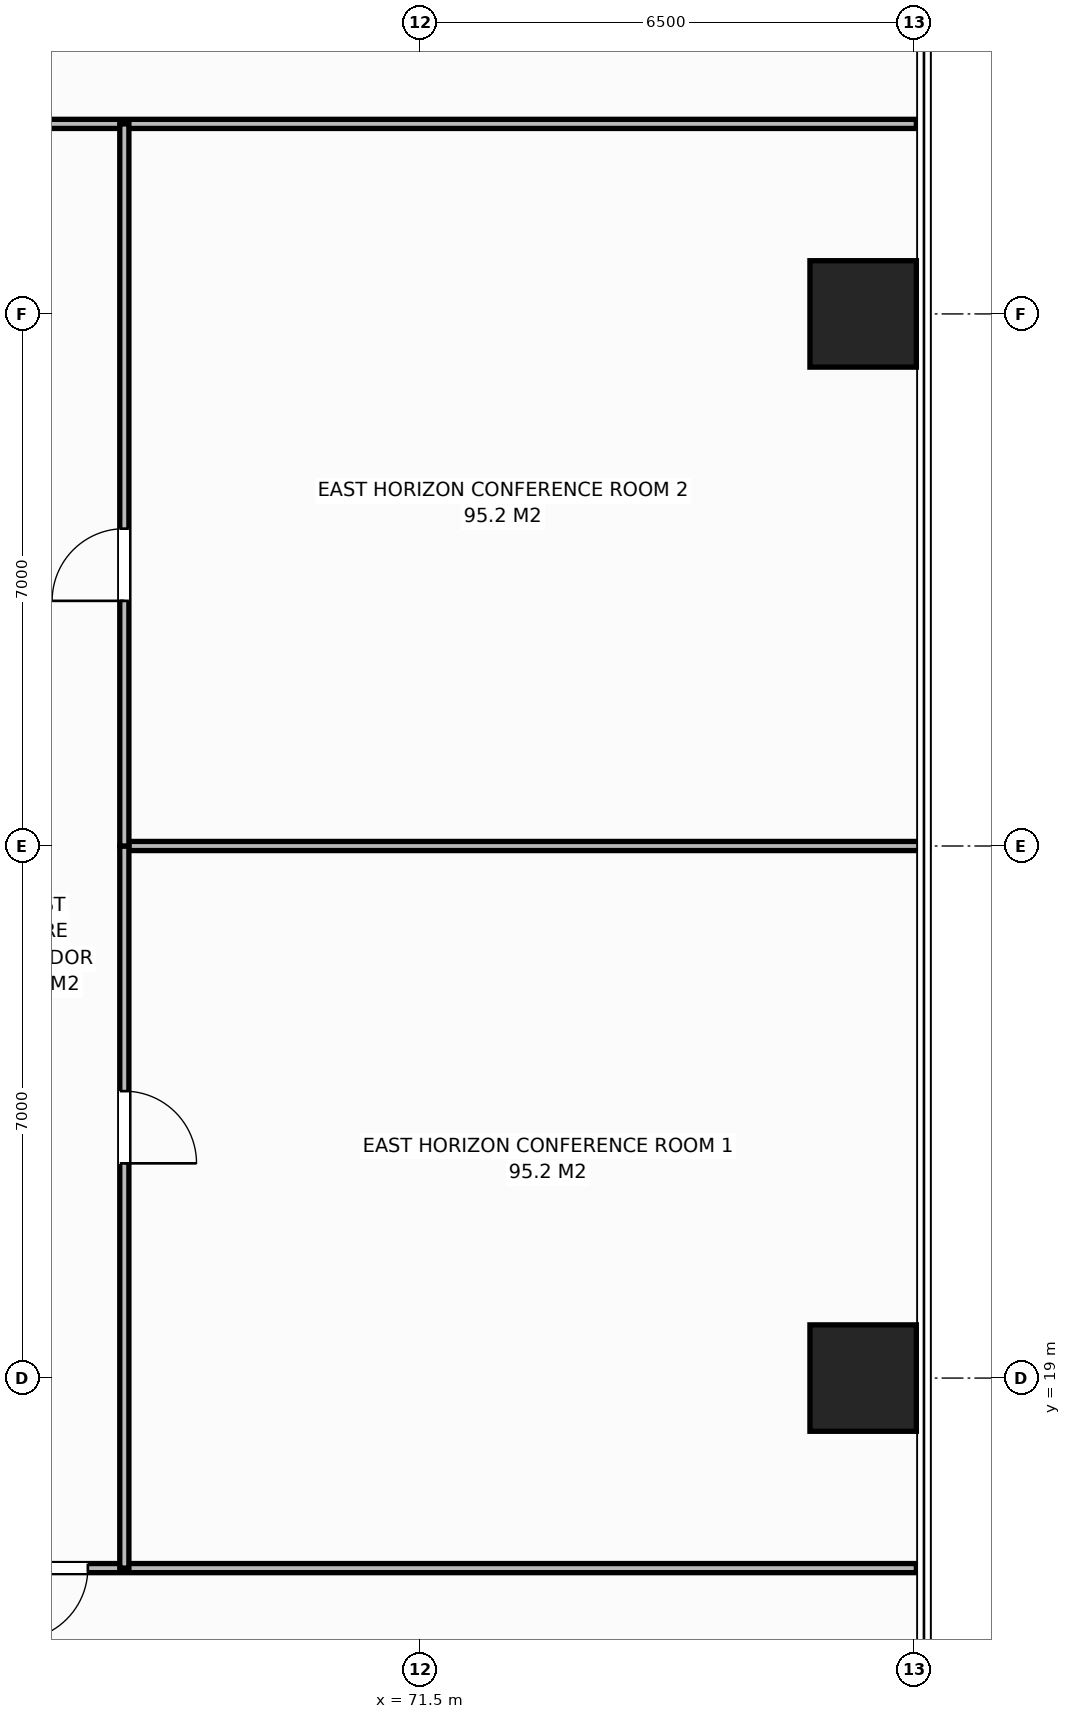
"""IFC4 building model, lengths in metres.
Left out: names, types, materials, properties, quantities, classifications, styles, units other than length and angle.
Written with IfcOpenShell. Run it as: python <this file> out.ifc"""

import sys

from ifc_helpers import new_model, si_unit, direction, frame, frame_2d, origin, origin_2d, place, context, subcontext, project, spatial, rectangle, extrude, element, fill, save


model = new_model("IFC4")
c1 = context("Model", 3, precision=1e-05, world=origin(), true_north=direction((0.0, 1.0)))
c2 = subcontext(c1, "Body", "Model", "MODEL_VIEW")
j1 = project(units=[si_unit("LENGTHUNIT", "METRE"), si_unit("PLANEANGLEUNIT", "RADIAN")], contexts=[c1])
p1 = place(None, origin())
s1 = spatial("IfcSite", under=j1, at=p1, CompositionType="ELEMENT")
p2 = place(p1, origin())
s2 = spatial("IfcBuilding", under=s1, at=p2, CompositionType="ELEMENT")
p3 = place(p2, frame((0.0, 0.0, 69.6)))
s3 = spatial("IfcBuildingStorey", under=s2, at=p3, CompositionType="ELEMENT", Elevation=69.6)
for number, where, z_axis, x_axis in (
    (1, (77.32, 19.0, 0.0), (0.0, 0.0, 1.0), (1.0, 0.0, 0.0)),
    (2, (77.32, 33.0, 0.0), (0.0, 0.0, 1.0), (1.0, 0.0, 0.0)),
):
    element("IfcColumn", number, at=place(p3, frame(where, z_axis=z_axis, x_axis=x_axis)), inside=s3, PredefinedType="COLUMN", context=c2, shape_type="SweptSolid", body=[
        extrude(rectangle(XDim=1.4, YDim=1.4, at=origin_2d()), origin(), (0.0, 0.0, 1.0), 3.8),
    ])
p4 = place(p3, frame((56.884, 35.5, 0.0), z_axis=(0.0, 0.0, 1.0), x_axis=(1.0, 0.0, 0.0)))
e3 = element("IfcWall", 3, at=p4, inside=s3, PredefinedType="PARTITIONING", context=c2, shape_type="SweptSolid", body=[
    extrude(rectangle(XDim=21.136, YDim=0.12, at=frame_2d((10.568, 0.0))), origin(), (0.0, 0.0, 1.0), 3.55),
])
p5 = place(p4, frame((4.883, 0.0, 0.0)))
e4 = element("IfcOpeningElement", 4, at=p5, cuts=e3, PredefinedType="OPENING", context=c2, shape_type="SweptSolid", body=[
    extrude(rectangle(XDim=0.95, YDim=2.15, at=frame_2d((0.475, 1.075))), frame((0.0, 0.07, 0.0), z_axis=(0.0, -1.0, 0.0), x_axis=(1.0, 0.0, 0.0)), (0.0, 0.0, 1.0), 0.14),
])
p6 = place(p3, frame((64.86, 16.5, 0.0), z_axis=(0.0, 0.0, 1.0), x_axis=(1.0, 0.0, 0.0)))
e5 = element("IfcWall", 5, at=p6, inside=s3, PredefinedType="PARTITIONING", context=c2, shape_type="SweptSolid", body=[
    extrude(rectangle(XDim=13.16, YDim=0.12, at=frame_2d((6.58, 0.0))), origin(), (0.0, 0.0, 1.0), 3.55),
])
p7 = place(p6, frame((1.31, 0.0, 0.0)))
e6 = element("IfcOpeningElement", 6, at=p7, cuts=e5, PredefinedType="OPENING", context=c2, shape_type="SweptSolid", body=[
    extrude(rectangle(XDim=0.95, YDim=2.15, at=frame_2d((0.475, 1.075))), frame((0.0, 0.07, 0.0), z_axis=(0.0, -1.0, 0.0), x_axis=(1.0, 0.0, 0.0)), (0.0, 0.0, 1.0), 0.14),
])
p8 = place(p3, frame((67.6, 26.0, 0.0), z_axis=(0.0, 0.0, 1.0), x_axis=(1.0, 0.0, 0.0)))
e7 = element("IfcWall", 7, at=p8, inside=s3, PredefinedType="PARTITIONING", context=c2, shape_type="SweptSolid", body=[
    extrude(rectangle(XDim=10.58, YDim=0.12, at=frame_2d((5.29, 0.0))), origin(), (0.0, 0.0, 1.0), 3.55),
])
p9 = place(p3, frame((67.6, 16.5, 0.0), z_axis=(0.0, 0.0, 1.0), x_axis=(0.0, 1.0, 0.0)))
e8 = element("IfcWall", 8, at=p9, inside=s3, PredefinedType="PARTITIONING", context=c2, shape_type="SweptSolid", body=[
    extrude(rectangle(XDim=9.5, YDim=0.12, at=frame_2d((4.75, 0.0))), origin(), (0.0, 0.0, 1.0), 3.55),
])
p10 = place(p9, frame((5.325, 0.0, 0.0)))
e9 = element("IfcOpeningElement", 9, at=p10, cuts=e8, PredefinedType="OPENING", context=c2, shape_type="SweptSolid", body=[
    extrude(rectangle(XDim=0.95, YDim=2.15, at=frame_2d((0.475, 1.075))), frame((0.0, 0.07, 0.0), z_axis=(0.0, -1.0, 0.0), x_axis=(1.0, 0.0, 0.0)), (0.0, 0.0, 1.0), 0.14),
])
p11 = place(p3, frame((67.6, 26.0, 0.0), z_axis=(0.0, 0.0, 1.0), x_axis=(0.0, 1.0, 0.0)))
e10 = element("IfcWall", 10, at=p11, inside=s3, PredefinedType="PARTITIONING", context=c2, shape_type="SweptSolid", body=[
    extrude(rectangle(XDim=9.5, YDim=0.12, at=frame_2d((4.75, 0.0))), origin(), (0.0, 0.0, 1.0), 3.55),
])
p12 = place(p11, frame((3.225, 0.0, 0.0)))
e11 = element("IfcOpeningElement", 11, at=p12, cuts=e10, PredefinedType="OPENING", context=c2, shape_type="SweptSolid", body=[
    extrude(rectangle(XDim=0.95, YDim=2.15, at=frame_2d((0.475, 1.075))), frame((0.0, 0.07, 0.0), z_axis=(0.0, -1.0, 0.0), x_axis=(1.0, 0.0, 0.0)), (0.0, 0.0, 1.0), 0.14),
])
p13 = place(p7, origin())
e12 = element("IfcDoor", 12, at=p13, inside=s3, OperationType="SINGLE_SWING_RIGHT", PredefinedType="DOOR", context=c2, shape_type="SweptSolid", body=[
    extrude(rectangle(XDim=0.95, YDim=2.15, at=frame_2d((0.475, 1.075))), frame((0.0, 0.025, 0.0), z_axis=(0.0, -1.0, 0.0), x_axis=(1.0, 0.0, 0.0)), (0.0, 0.0, 1.0), 0.05),
])
fill(e6, e12)
p14 = place(p10, origin())
e13 = element("IfcDoor", 13, at=p14, inside=s3, OperationType="SINGLE_SWING_RIGHT", PredefinedType="DOOR", context=c2, shape_type="SweptSolid", body=[
    extrude(rectangle(XDim=0.95, YDim=2.15, at=frame_2d((0.475, 1.075))), frame((0.0, 0.025, 0.0), z_axis=(0.0, -1.0, 0.0), x_axis=(1.0, 0.0, 0.0)), (0.0, 0.0, 1.0), 0.05),
])
fill(e9, e13)
p15 = place(p12, origin())
e14 = element("IfcDoor", 14, at=p15, inside=s3, OperationType="SINGLE_SWING_LEFT", PredefinedType="DOOR", context=c2, shape_type="SweptSolid", body=[
    extrude(rectangle(XDim=0.95, YDim=2.15, at=frame_2d((0.475, 1.075))), frame((0.0, 0.025, 0.0), z_axis=(0.0, -1.0, 0.0), x_axis=(1.0, 0.0, 0.0)), (0.0, 0.0, 1.0), 0.05),
])
fill(e11, e14)
save(model, sys.argv[1])
